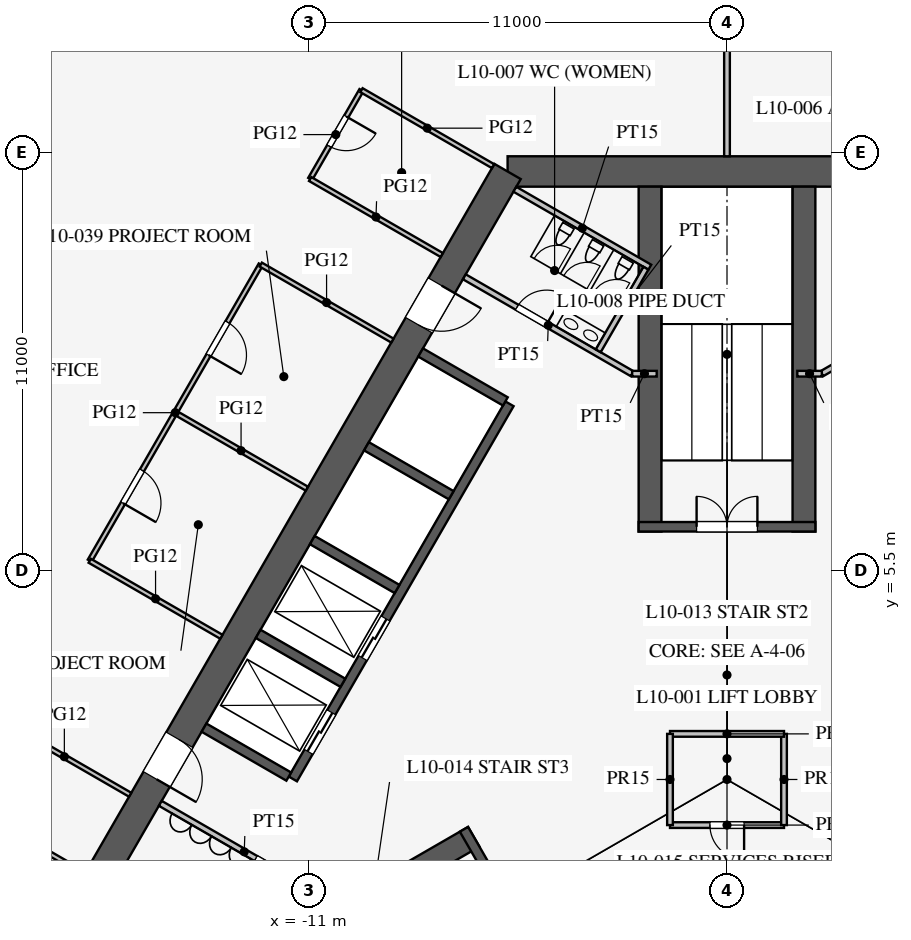
"""IFC4 building model, lengths in metres.
Left out: names, types, materials, properties, quantities, classifications, styles, units other than length and angle.
Written with IfcOpenShell. Run it as: python <this file> out.ifc"""

import sys

from ifc_helpers import new_model, si_unit, direction, frame, frame_2d, origin, place, context, subcontext, project, spatial, rectangle, extrude, element, fill, save


model = new_model("IFC4")
c1 = context("Model", 3, precision=1e-05, world=origin(), true_north=direction((0.0, 1.0)))
c2 = subcontext(c1, "Body", "Model", "MODEL_VIEW")
j1 = project(units=[si_unit("LENGTHUNIT", "METRE"), si_unit("PLANEANGLEUNIT", "RADIAN")], contexts=[c1])
p1 = place(None, origin())
s1 = spatial("IfcSite", under=j1, at=p1, CompositionType="ELEMENT")
p2 = place(p1, origin())
s2 = spatial("IfcBuilding", under=s1, at=p2, CompositionType="ELEMENT")
p3 = place(p2, frame((0.0, 0.0, 45.9)))
s3 = spatial("IfcBuildingStorey", under=s2, at=p3, CompositionType="ELEMENT", Elevation=45.9)
p4 = place(p3, frame((5.773, 16.0, 0.0), z_axis=(0.0, 0.0, 1.0), x_axis=(-1.0, 0.0, 0.0)))
e1 = element("IfcWall", 1, at=p4, inside=s3, PredefinedType="SHEAR", context=c2, shape_type="SweptSolid", body=[
    extrude(rectangle(XDim=11.547, YDim=0.8, at=frame_2d((5.773, 0.0))), origin(), (0.0, 0.0, 1.0), 4.2),
])
p5 = place(p3, frame((-5.773, 16.0, 0.0), z_axis=(0.0, 0.0, 1.0), x_axis=(-0.500002442456, -0.866023993627, 0.0)))
e2 = element("IfcWall", 2, at=p5, inside=s3, PredefinedType="SHEAR", context=c2, shape_type="SweptSolid", body=[
    extrude(rectangle(XDim=21.939, YDim=0.8, at=frame_2d((10.97, 0.0))), origin(), (0.0, 0.0, 1.0), 4.2),
])
p6 = place(p5, frame((17.27, 0.0, 0.0)))
e3 = element("IfcOpeningElement", 3, at=p6, cuts=e2, PredefinedType="OPENING", context=c2, shape_type="SweptSolid", body=[
    extrude(rectangle(XDim=1.2, YDim=2.1, at=frame_2d((0.6, 1.05))), frame((0.0, 0.41, 0.0), z_axis=(0.0, -1.0, 0.0), x_axis=(1.0, 0.0, 0.0)), (0.0, 0.0, 1.0), 0.82),
])
p7 = place(p5, frame((3.47, 0.0, 0.0)))
e4 = element("IfcOpeningElement", 4, at=p7, cuts=e2, PredefinedType="OPENING", context=c2, shape_type="SweptSolid", body=[
    extrude(rectangle(XDim=1.2, YDim=2.1, at=frame_2d((0.6, 1.05))), frame((0.0, 0.41, 0.0), z_axis=(0.0, -1.0, 0.0), x_axis=(1.0, 0.0, 0.0)), (0.0, 0.0, 1.0), 0.82),
])
p8 = place(p3, frame((-5.724, 9.886, 0.0), z_axis=(0.0, 0.0, 1.0), x_axis=(-0.500001763848, -0.866024385424, 0.0)))
e5 = element("IfcWall", 5, at=p8, inside=s3, PredefinedType="SHEAR", context=c2, shape_type="SweptSolid", body=[
    extrude(rectangle(XDim=11.4, YDim=0.25, at=frame_2d((5.7, 0.0))), origin(), (0.0, 0.0, 1.0), 4.2),
])
p9 = place(p8, frame((6.525, 0.0, 0.0)))
e6 = element("IfcOpeningElement", 6, at=p9, cuts=e5, PredefinedType="OPENING", context=c2, shape_type="SweptSolid", body=[
    extrude(rectangle(XDim=1.2, YDim=2.2, at=frame_2d((0.6, 1.1))), frame((0.0, 0.135, 0.0), z_axis=(0.0, -1.0, 0.0), x_axis=(1.0, 0.0, 0.0)), (0.0, 0.0, 1.0), 0.27),
])
p10 = place(p8, frame((9.375, 0.0, 0.0)))
e7 = element("IfcOpeningElement", 7, at=p10, cuts=e5, PredefinedType="OPENING", context=c2, shape_type="SweptSolid", body=[
    extrude(rectangle(XDim=1.2, YDim=2.2, at=frame_2d((0.6, 1.1))), frame((0.0, 0.135, 0.0), z_axis=(0.0, -1.0, 0.0), x_axis=(1.0, 0.0, 0.0)), (0.0, 0.0, 1.0), 0.27),
])
p11 = place(p3, frame((-5.832, 9.949, 0.0), z_axis=(0.0, 0.0, 1.0), x_axis=(-0.866029291668, 0.499993265928, 0.0)))
e8 = element("IfcWall", 8, at=p11, inside=s3, PredefinedType="SHEAR", context=c2, shape_type="SweptSolid", body=[
    extrude(rectangle(XDim=2.575, YDim=0.25, at=frame_2d((1.288, 0.0))), origin(), (0.0, 0.0, 1.0), 4.2),
])
for number, where, z_axis, x_axis in (
    (9, (-7.257, 7.481, 0.0), (0.0, 0.0, 1.0), (-0.866, 0.5, 0.0)),
    (10, (-8.682, 5.012, 0.0), (0.0, 0.0, 1.0), (-0.866, 0.5, 0.0)),
    (11, (-10.107, 2.544, 0.0), (0.0, 0.0, 1.0), (-0.866, 0.5, 0.0)),
    (12, (-11.532, 0.076, 0.0), (0.0, 0.0, 1.0), (-0.866, 0.5, 0.0)),
):
    element("IfcWall", number, at=place(p3, frame(where, z_axis=z_axis, x_axis=x_axis)), inside=s3, PredefinedType="SHEAR", context=c2, shape_type="SweptSolid", body=[
        extrude(rectangle(XDim=2.575, YDim=0.25, at=frame_2d((1.288, 0.0))), origin(), (0.0, 0.0, 1.0), 4.2),
    ])
for number, where, z_axis, x_axis in (
    (13, (2.025, 6.525, 0.0), (0.0, 0.0, 1.0), (0.0, 1.0, 0.0)),
    (14, (-2.025, 6.525, 0.0), (0.0, 0.0, 1.0), (0.0, 1.0, 0.0)),
):
    element("IfcWall", number, at=place(p3, frame(where, z_axis=z_axis, x_axis=x_axis)), inside=s3, PredefinedType="SHEAR", context=c2, shape_type="SweptSolid", body=[
        extrude(rectangle(XDim=9.075, YDim=0.6, at=frame_2d((4.538, 0.0))), origin(), (0.0, 0.0, 1.0), 4.2),
    ])
p12 = place(p3, frame((2.325, 6.65, 0.0), z_axis=(0.0, 0.0, 1.0), x_axis=(-1.0, 0.0, 0.0)))
e15 = element("IfcWall", 15, at=p12, inside=s3, PredefinedType="SHEAR", context=c2, shape_type="SweptSolid", body=[
    extrude(rectangle(XDim=4.65, YDim=0.25, at=frame_2d((2.325, 0.0))), origin(), (0.0, 0.0, 1.0), 4.2),
])
p13 = place(p12, frame((1.525, 0.0, 0.0)))
e16 = element("IfcOpeningElement", 16, at=p13, cuts=e15, PredefinedType="OPENING", context=c2, shape_type="SweptSolid", body=[
    extrude(rectangle(XDim=1.6, YDim=2.1, at=frame_2d((0.8, 1.05))), frame((0.0, 0.135, 0.0), z_axis=(0.0, -1.0, 0.0), x_axis=(1.0, 0.0, 0.0)), (0.0, 0.0, 1.0), 0.27),
])
p14 = place(p3, frame((-6.663, -1.509, 0.0), z_axis=(0.0, 0.0, 1.0), x_axis=(-0.866019375473, -0.500010441196, 0.0)))
e17 = element("IfcWall", 17, at=p14, inside=s3, PredefinedType="SHEAR", context=c2, shape_type="SweptSolid", body=[
    extrude(rectangle(XDim=9.075, YDim=0.6, at=frame_2d((4.538, 0.0))), origin(), (0.0, 0.0, 1.0), 4.2),
])
p15 = place(p3, frame((-6.922, -1.312, 0.0), z_axis=(0.0, 0.0, 1.0), x_axis=(0.499984536904, -0.866034331223, 0.0)))
e18 = element("IfcWall", 18, at=p15, inside=s3, PredefinedType="SHEAR", context=c2, shape_type="SweptSolid", body=[
    extrude(rectangle(XDim=4.65, YDim=0.25, at=frame_2d((2.325, 0.0))), origin(), (0.0, 0.0, 1.0), 4.2),
])
p16 = place(p15, frame((1.525, 0.0, 0.0)))
e19 = element("IfcOpeningElement", 19, at=p16, cuts=e18, PredefinedType="OPENING", context=c2, shape_type="SweptSolid", body=[
    extrude(rectangle(XDim=1.6, YDim=2.1, at=frame_2d((0.8, 1.05))), frame((0.0, 0.135, 0.0), z_axis=(0.0, -1.0, 0.0), x_axis=(1.0, 0.0, 0.0)), (0.0, 0.0, 1.0), 0.27),
])
p17 = place(p3, frame((2.495, 10.678, 0.0), z_axis=(0.0, 0.0, 1.0), x_axis=(0.86602216432, 0.500005610874, 0.0)))
e20 = element("IfcWall", 20, at=p17, inside=s3, PredefinedType="PARTITIONING", context=c2, shape_type="SweptSolid", body=[
    extrude(rectangle(XDim=5.1, YDim=0.15, at=frame_2d((2.55, 0.0))), origin(), (0.0, 0.0, 1.0), 4.0),
])
p18 = place(p17, frame((2.6, 0.0, 0.0)))
e21 = element("IfcOpeningElement", 21, at=p18, cuts=e20, PredefinedType="OPENING", context=c2, shape_type="SweptSolid", body=[
    extrude(rectangle(XDim=0.9, YDim=2.1, at=frame_2d((0.45, 1.05))), frame((0.0, 0.085, 0.0), z_axis=(0.0, -1.0, 0.0), x_axis=(1.0, 0.0, 0.0)), (0.0, 0.0, 1.0), 0.17),
])
p19 = place(p3, frame((-10.495, -3.178, 0.0), z_axis=(0.0, 0.0, 1.0), x_axis=(-0.86602216432, 0.500005610874, 0.0)))
e22 = element("IfcWall", 22, at=p19, inside=s3, PredefinedType="PARTITIONING", context=c2, shape_type="SweptSolid", body=[
    extrude(rectangle(XDim=5.1, YDim=0.15, at=frame_2d((2.55, 0.0))), origin(), (0.0, 0.0, 1.0), 4.0),
])
p20 = place(p19, frame((1.3, 0.0, 0.0)))
e23 = element("IfcOpeningElement", 23, at=p20, cuts=e22, PredefinedType="OPENING", context=c2, shape_type="SweptSolid", body=[
    extrude(rectangle(XDim=0.9, YDim=2.1, at=frame_2d((0.45, 1.05))), frame((0.0, 0.085, 0.0), z_axis=(0.0, -1.0, 0.0), x_axis=(1.0, 0.0, 0.0)), (0.0, 0.0, 1.0), 0.17),
])
p21 = place(p3, frame((-2.495, 10.678, 0.0), z_axis=(0.0, 0.0, 1.0), x_axis=(-0.86602216432, 0.500005610874, 0.0)))
e24 = element("IfcWall", 24, at=p21, inside=s3, PredefinedType="PARTITIONING", context=c2, shape_type="SweptSolid", body=[
    extrude(rectangle(XDim=5.1, YDim=0.15, at=frame_2d((2.55, 0.0))), origin(), (0.0, 0.0, 1.0), 4.0),
])
p22 = place(p21, frame((2.6, 0.0, 0.0)))
e25 = element("IfcOpeningElement", 25, at=p22, cuts=e24, PredefinedType="OPENING", context=c2, shape_type="SweptSolid", body=[
    extrude(rectangle(XDim=0.9, YDim=2.1, at=frame_2d((0.45, 1.05))), frame((0.0, 0.085, 0.0), z_axis=(0.0, -1.0, 0.0), x_axis=(1.0, 0.0, 0.0)), (0.0, 0.0, 1.0), 0.17),
])
for number, where, z_axis, x_axis in (
    (26, (2.495, 10.678, 0.0), (0.0, 0.0, 1.0), (-1.0, 0.0, 0.0)),
    (27, (-2.495, 10.678, 0.0), (0.0, 0.0, 1.0), (1.0, 0.0, 0.0)),
):
    element("IfcWall", number, at=place(p3, frame(where, z_axis=z_axis, x_axis=x_axis)), inside=s3, PredefinedType="PARTITIONING", context=c2, shape_type="SweptSolid", body=[
        extrude(rectangle(XDim=0.645, YDim=0.15, at=frame_2d((0.323, 0.0))), origin(), (0.0, 0.0, 1.0), 4.0),
    ])
p23 = place(p3, frame((-2.031, 13.482, 0.0), z_axis=(0.0, 0.0, 1.0), x_axis=(-0.866050731258, 0.499956128963, 0.0)))
e28 = element("IfcWall", 28, at=p23, inside=s3, PredefinedType="PARTITIONING", context=c2, shape_type="SweptSolid", body=[
    extrude(rectangle(XDim=4.1, YDim=0.15, at=frame_2d((2.05, 0.0))), origin(), (0.0, 0.0, 1.0), 4.0),
])
p24 = place(p3, frame((-3.389, 11.281, 0.0), z_axis=(0.0, 0.0, 1.0), x_axis=(0.499989096993, 0.866031698547, 0.0)))
e29 = element("IfcWall", 29, at=p24, inside=s3, PredefinedType="PARTITIONING", context=c2, shape_type="SweptSolid", body=[
    extrude(rectangle(XDim=2.51, YDim=0.15, at=frame_2d((1.255, 0.0))), origin(), (0.0, 0.0, 1.0), 4.0),
])
p25 = place(p3, frame((-1.5, -1.2, 0.0), z_axis=(0.0, 0.0, 1.0), x_axis=(1.0, 0.0, 0.0)))
e30 = element("IfcWall", 30, at=p25, inside=s3, PredefinedType="PARTITIONING", context=c2, shape_type="SweptSolid", body=[
    extrude(rectangle(XDim=3.0, YDim=0.15, at=frame_2d((1.5, 0.0))), origin(), (0.0, 0.0, 1.0), 4.0),
])
p26 = place(p25, frame((1.05, 0.0, 0.0)))
e31 = element("IfcOpeningElement", 31, at=p26, cuts=e30, PredefinedType="OPENING", context=c2, shape_type="SweptSolid", body=[
    extrude(rectangle(XDim=0.9, YDim=2.1, at=frame_2d((0.45, 1.05))), frame((0.0, 0.085, 0.0), z_axis=(0.0, -1.0, 0.0), x_axis=(1.0, 0.0, 0.0)), (0.0, 0.0, 1.0), 0.17),
])
p27 = place(p3, frame((1.5, -1.2, 0.0), z_axis=(0.0, 0.0, 1.0), x_axis=(0.0, 1.0, 0.0)))
e32 = element("IfcWall", 32, at=p27, inside=s3, PredefinedType="PARTITIONING", context=c2, shape_type="SweptSolid", body=[
    extrude(rectangle(XDim=2.4, YDim=0.15, at=frame_2d((1.2, 0.0))), origin(), (0.0, 0.0, 1.0), 4.0),
])
p28 = place(p3, frame((1.5, 1.2, 0.0), z_axis=(0.0, 0.0, 1.0), x_axis=(-1.0, 0.0, 0.0)))
e33 = element("IfcWall", 33, at=p28, inside=s3, PredefinedType="PARTITIONING", context=c2, shape_type="SweptSolid", body=[
    extrude(rectangle(XDim=3.0, YDim=0.15, at=frame_2d((1.5, 0.0))), origin(), (0.0, 0.0, 1.0), 4.0),
])
p29 = place(p3, frame((-1.5, 1.2, 0.0), z_axis=(0.0, 0.0, 1.0), x_axis=(0.0, -1.0, 0.0)))
e34 = element("IfcWall", 34, at=p29, inside=s3, PredefinedType="PARTITIONING", context=c2, shape_type="SweptSolid", body=[
    extrude(rectangle(XDim=2.4, YDim=0.15, at=frame_2d((1.2, 0.0))), origin(), (0.0, 0.0, 1.0), 4.0),
])
p30 = place(p3, frame((0.0, 16.4, 0.0), z_axis=(0.0, 0.0, 1.0), x_axis=(0.0, 1.0, 0.0)))
e35 = element("IfcWall", 35, at=p30, inside=s3, PredefinedType="PARTITIONING", context=c2, shape_type="SweptSolid", body=[
    extrude(rectangle(XDim=18.25, YDim=0.15, at=frame_2d((9.125, 0.0))), origin(), (0.0, 0.0, 1.0), 2.3),
])
p31 = place(p3, frame((-14.519, 9.653, 0.0), z_axis=(0.0, 0.0, 1.0), x_axis=(-0.500013631625, -0.866017533419, 0.0)))
e36 = element("IfcWall", 36, at=p31, inside=s3, PredefinedType="PARTITIONING", context=c2, shape_type="SweptSolid", body=[
    extrude(rectangle(XDim=4.5, YDim=0.12, at=frame_2d((2.25, 0.0))), origin(), (0.0, 0.0, 1.0), 2.9),
])
p32 = place(p31, frame((1.75, 0.0, 0.15)))
e37 = element("IfcOpeningElement", 37, at=p32, cuts=e36, PredefinedType="OPENING", context=c2, shape_type="SweptSolid", body=[
    extrude(rectangle(XDim=1.0, YDim=2.1, at=frame_2d((0.5, 1.05))), frame((0.0, 0.07, 0.0), z_axis=(0.0, -1.0, 0.0), x_axis=(1.0, 0.0, 0.0)), (0.0, 0.0, 1.0), 0.14),
])
p33 = place(p3, frame((-9.619, 18.14, 0.0), z_axis=(0.0, 0.0, 1.0), x_axis=(-0.499980770555, -0.866036505625, 0.0)))
e38 = element("IfcWall", 38, at=p33, inside=s3, PredefinedType="PARTITIONING", context=c2, shape_type="SweptSolid", body=[
    extrude(rectangle(XDim=2.7, YDim=0.12, at=frame_2d((1.35, 0.0))), origin(), (0.0, 0.0, 1.0), 2.9),
])
p34 = place(p33, frame((0.8, 0.0, 0.15)))
e39 = element("IfcOpeningElement", 39, at=p34, cuts=e38, PredefinedType="OPENING", context=c2, shape_type="SweptSolid", body=[
    extrude(rectangle(XDim=0.9, YDim=2.1, at=frame_2d((0.45, 1.05))), frame((0.0, 0.07, 0.0), z_axis=(0.0, -1.0, 0.0), x_axis=(1.0, 0.0, 0.0)), (0.0, 0.0, 1.0), 0.14),
])
p35 = place(p3, frame((-12.269, 13.55, 0.0), z_axis=(0.0, 0.0, 1.0), x_axis=(-0.499990139034, -0.866031096941, 0.0)))
e40 = element("IfcWall", 40, at=p35, inside=s3, PredefinedType="PARTITIONING", context=c2, shape_type="SweptSolid", body=[
    extrude(rectangle(XDim=4.5, YDim=0.12, at=frame_2d((2.25, 0.0))), origin(), (0.0, 0.0, 1.0), 2.9),
])
p36 = place(p35, frame((1.75, 0.0, 0.15)))
e41 = element("IfcOpeningElement", 41, at=p36, cuts=e40, PredefinedType="OPENING", context=c2, shape_type="SweptSolid", body=[
    extrude(rectangle(XDim=1.0, YDim=2.1, at=frame_2d((0.5, 1.05))), frame((0.0, 0.07, 0.0), z_axis=(0.0, -1.0, 0.0), x_axis=(1.0, 0.0, 0.0)), (0.0, 0.0, 1.0), 0.14),
])
for number, where, z_axis, x_axis in (
    (42, (-16.905, -2.48, 0.0), (0.0, 0.0, 1.0), (-0.866, 0.5, 0.0)),
    (43, (-13.305, 3.756, 0.0), (0.0, 0.0, 1.0), (-0.866, 0.5, 0.0)),
    (44, (-15.705, -0.401, 0.0), (0.0, 0.0, 1.0), (-0.866, 0.5, 0.0)),
    (45, (-11.055, 7.653, 0.0), (0.0, 0.0, 1.0), (-0.866, 0.5, 0.0)),
    (46, (-6.155, 16.14, 0.0), (0.0, 0.0, 1.0), (-0.866, 0.5, 0.0)),
    (47, (-8.805, 11.55, 0.0), (0.0, 0.0, 1.0), (-0.866, 0.5, 0.0)),
    (48, (-7.505, 13.802, 0.0), (0.0, 0.0, 1.0), (-0.866, 0.5, 0.0)),
):
    element("IfcWall", number, at=place(p3, frame(where, z_axis=z_axis, x_axis=x_axis)), inside=s3, PredefinedType="PARTITIONING", context=c2, shape_type="SweptSolid", body=[
        extrude(rectangle(XDim=4.0, YDim=0.12, at=frame_2d((2.0, 0.0))), origin(), (0.0, 0.0, 1.0), 2.9),
    ])
p37 = place(p20, origin())
e49 = element("IfcDoor", 49, at=p37, inside=s3, OperationType="SINGLE_SWING_LEFT", PredefinedType="DOOR", context=c2, shape_type="SweptSolid", body=[
    extrude(rectangle(XDim=0.9, YDim=2.1, at=frame_2d((0.45, 1.05))), frame((0.0, 0.025, 0.0), z_axis=(0.0, -1.0, 0.0), x_axis=(1.0, 0.0, 0.0)), (0.0, 0.0, 1.0), 0.05),
])
fill(e23, e49)
p38 = place(p22, frame((0.9, 0.0, 0.0), z_axis=(0.0, 0.0, 1.0), x_axis=(-1.0, 0.0, 0.0)))
e50 = element("IfcDoor", 50, at=p38, inside=s3, OperationType="SINGLE_SWING_RIGHT", PredefinedType="DOOR", context=c2, shape_type="SweptSolid", body=[
    extrude(rectangle(XDim=0.9, YDim=2.1, at=frame_2d((0.45, 1.05))), frame((0.0, 0.025, 0.0), z_axis=(0.0, -1.0, 0.0), x_axis=(1.0, 0.0, 0.0)), (0.0, 0.0, 1.0), 0.05),
])
fill(e25, e50)
p39 = place(p26, frame((0.9, 0.0, 0.0), z_axis=(0.0, 0.0, 1.0), x_axis=(-1.0, 0.0, 0.0)))
e51 = element("IfcDoor", 51, at=p39, inside=s3, OperationType="SINGLE_SWING_LEFT", PredefinedType="DOOR", context=c2, shape_type="SweptSolid", body=[
    extrude(rectangle(XDim=0.9, YDim=2.1, at=frame_2d((0.45, 1.05))), frame((0.0, 0.025, 0.0), z_axis=(0.0, -1.0, 0.0), x_axis=(1.0, 0.0, 0.0)), (0.0, 0.0, 1.0), 0.05),
])
fill(e31, e51)
p40 = place(p13, frame((1.6, 0.0, 0.0), z_axis=(0.0, 0.0, 1.0), x_axis=(-1.0, 0.0, 0.0)))
e52 = element("IfcDoor", 52, at=p40, inside=s3, OperationType="DOUBLE_DOOR_SINGLE_SWING", PredefinedType="DOOR", context=c2, shape_type="SweptSolid", body=[
    extrude(rectangle(XDim=1.6, YDim=2.1, at=frame_2d((0.8, 1.05))), frame((0.0, 0.025, 0.0), z_axis=(0.0, -1.0, 0.0), x_axis=(1.0, 0.0, 0.0)), (0.0, 0.0, 1.0), 0.05),
])
fill(e16, e52)
p41 = place(p6, origin())
e53 = element("IfcDoor", 53, at=p41, inside=s3, OperationType="SINGLE_SWING_RIGHT", PredefinedType="DOOR", context=c2, shape_type="SweptSolid", body=[
    extrude(rectangle(XDim=1.2, YDim=2.1, at=frame_2d((0.6, 1.05))), frame((0.0, 0.025, 0.0), z_axis=(0.0, -1.0, 0.0), x_axis=(1.0, 0.0, 0.0)), (0.0, 0.0, 1.0), 0.05),
])
fill(e3, e53)
p42 = place(p7, origin())
e54 = element("IfcDoor", 54, at=p42, inside=s3, OperationType="SINGLE_SWING_LEFT", PredefinedType="DOOR", context=c2, shape_type="SweptSolid", body=[
    extrude(rectangle(XDim=1.2, YDim=2.1, at=frame_2d((0.6, 1.05))), frame((0.0, 0.025, 0.0), z_axis=(0.0, -1.0, 0.0), x_axis=(1.0, 0.0, 0.0)), (0.0, 0.0, 1.0), 0.05),
])
fill(e4, e54)
p43 = place(p36, origin())
e55 = element("IfcDoor", 55, at=p43, inside=s3, OperationType="SINGLE_SWING_RIGHT", PredefinedType="DOOR", context=c2, shape_type="SweptSolid", body=[
    extrude(rectangle(XDim=1.0, YDim=2.1, at=frame_2d((0.5, 1.05))), frame((0.0, 0.025, 0.0), z_axis=(0.0, -1.0, 0.0), x_axis=(1.0, 0.0, 0.0)), (0.0, 0.0, 1.0), 0.05),
])
fill(e41, e55)
p44 = place(p32, origin())
e56 = element("IfcDoor", 56, at=p44, inside=s3, OperationType="SINGLE_SWING_RIGHT", PredefinedType="DOOR", context=c2, shape_type="SweptSolid", body=[
    extrude(rectangle(XDim=1.0, YDim=2.1, at=frame_2d((0.5, 1.05))), frame((0.0, 0.025, 0.0), z_axis=(0.0, -1.0, 0.0), x_axis=(1.0, 0.0, 0.0)), (0.0, 0.0, 1.0), 0.05),
])
fill(e37, e56)
p45 = place(p34, origin())
e57 = element("IfcDoor", 57, at=p45, inside=s3, OperationType="SINGLE_SWING_LEFT", PredefinedType="DOOR", context=c2, shape_type="SweptSolid", body=[
    extrude(rectangle(XDim=0.9, YDim=2.1, at=frame_2d((0.45, 1.05))), frame((0.0, 0.025, 0.0), z_axis=(0.0, -1.0, 0.0), x_axis=(1.0, 0.0, 0.0)), (0.0, 0.0, 1.0), 0.05),
])
fill(e39, e57)
p46 = place(p9, origin())
e58 = element("IfcDoor", 58, at=p46, inside=s3, OperationType="DOUBLE_DOOR_SLIDING", PredefinedType="DOOR", context=c2, shape_type="SweptSolid", body=[
    extrude(rectangle(XDim=1.2, YDim=2.2, at=frame_2d((0.6, 1.1))), frame((0.0, 0.025, 0.0), z_axis=(0.0, -1.0, 0.0), x_axis=(1.0, 0.0, 0.0)), (0.0, 0.0, 1.0), 0.05),
])
fill(e6, e58)
p47 = place(p10, origin())
e59 = element("IfcDoor", 59, at=p47, inside=s3, OperationType="DOUBLE_DOOR_SLIDING", PredefinedType="DOOR", context=c2, shape_type="SweptSolid", body=[
    extrude(rectangle(XDim=1.2, YDim=2.2, at=frame_2d((0.6, 1.1))), frame((0.0, 0.025, 0.0), z_axis=(0.0, -1.0, 0.0), x_axis=(1.0, 0.0, 0.0)), (0.0, 0.0, 1.0), 0.05),
])
fill(e7, e59)
save(model, sys.argv[1])
